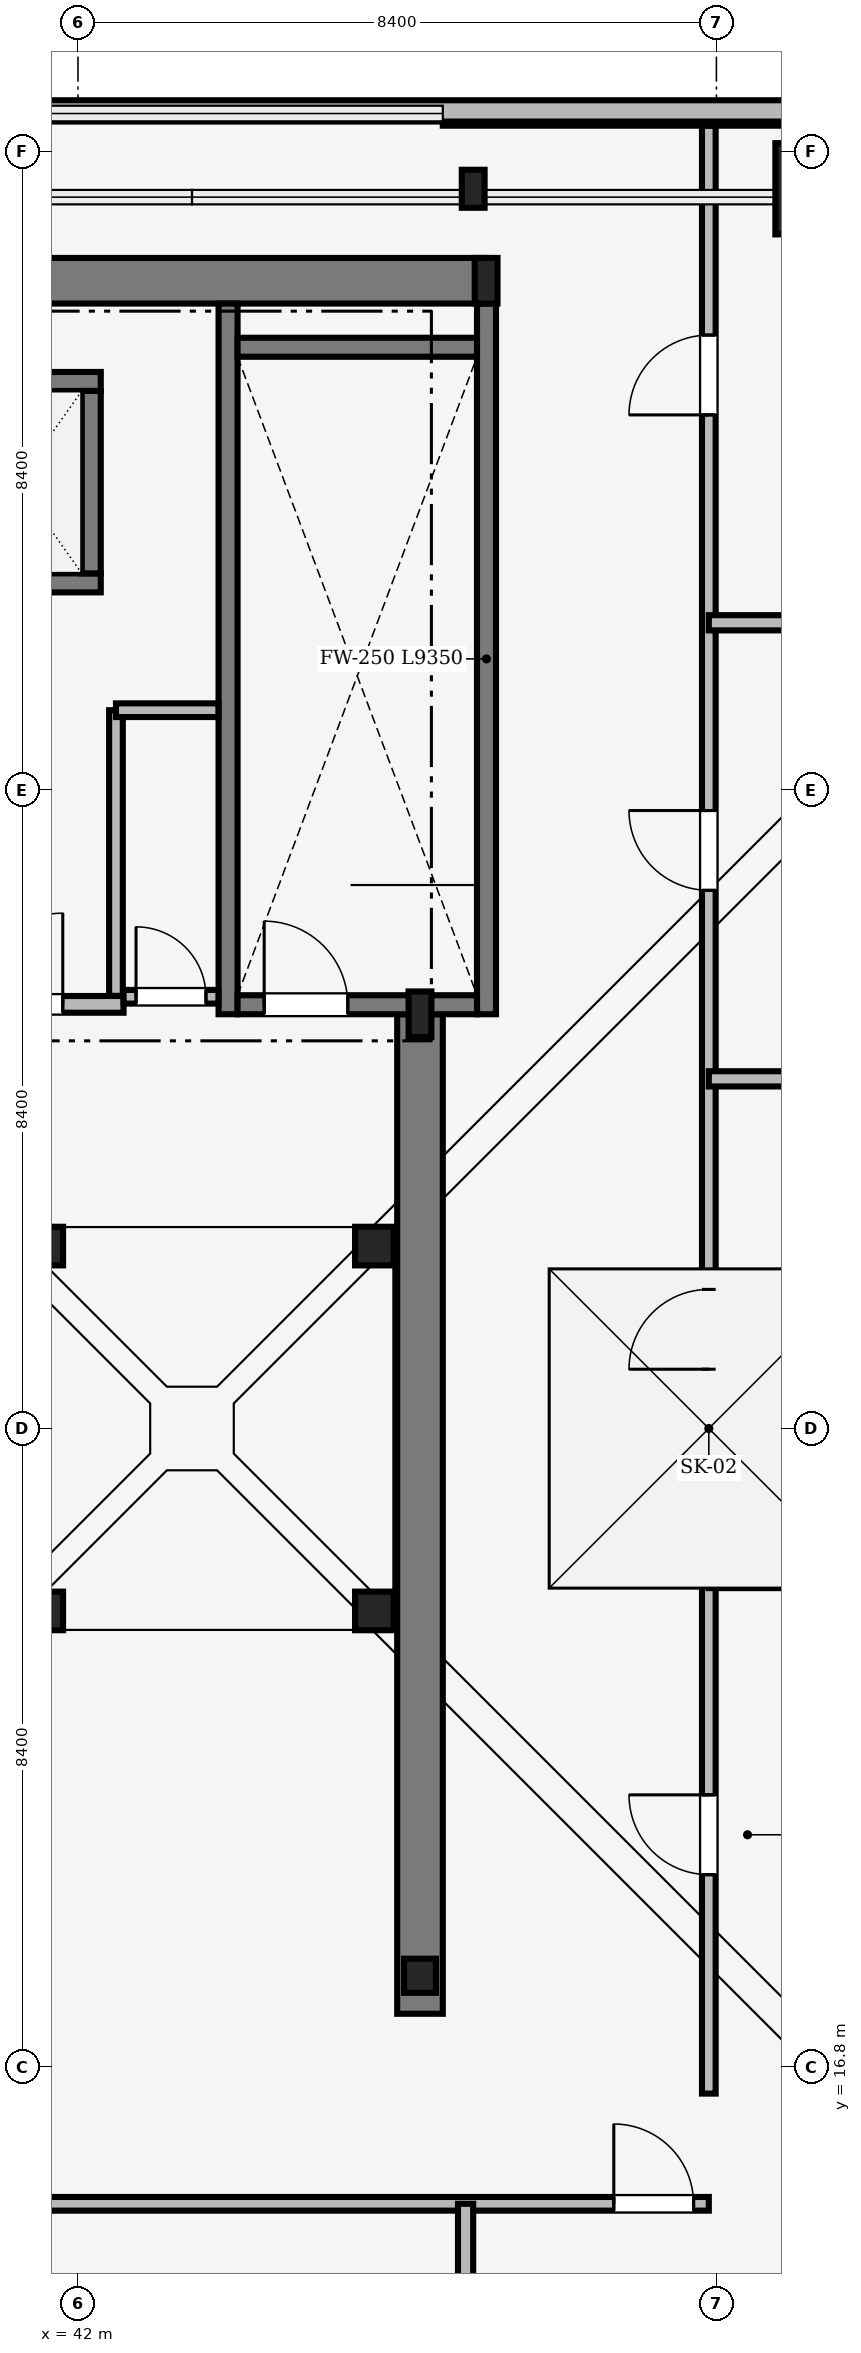
"""IFC4 building model, lengths in metres.
Left out: names, types, materials, properties, quantities, classifications, styles, units other than length and angle.
Written with IfcOpenShell. Run it as: python <this file> out.ifc"""

import sys

from ifc_helpers import new_model, si_unit, direction, frame, frame_2d, origin, origin_2d, place, context, subcontext, project, spatial, rectangle, hollow_circle, i_section, extrude, source, transform, mapped, element, fill, save


model = new_model("IFC4")
c1 = context("Model", 3, precision=1e-05, world=origin(), true_north=direction((0.0, 1.0)))
c2 = subcontext(c1, "Body", "Model", "MODEL_VIEW")
j1 = project(units=[si_unit("LENGTHUNIT", "METRE"), si_unit("PLANEANGLEUNIT", "RADIAN")], contexts=[c1])
p1 = place(None, origin())
s1 = spatial("IfcSite", under=j1, at=p1, CompositionType="ELEMENT")
p2 = place(p1, origin())
s2 = spatial("IfcBuilding", under=s1, at=p2, CompositionType="ELEMENT")
p3 = place(p2, frame((0.0, 0.0, 301.15)))
s3 = spatial("IfcBuildingStorey", under=s2, at=p3, CompositionType="ELEMENT", Elevation=301.15)
m1 = source(origin(), c2, "Body", "SweptSolid", [
    extrude(rectangle(XDim=17.52, YDim=0.6, at=frame_2d((8.76, 0.0))), origin(), (0.0, 0.0, 1.0), 4.7),
])
p4 = place(p3, frame((29.85, 40.3, 0.0), z_axis=(0.0, 0.0, 1.0), x_axis=(1.0, 0.0, 0.0)))
e1 = element("IfcWall", 1, at=p4, inside=s3, PredefinedType="SHEAR", context=c2, shape_type="MappedRepresentation", body=[
    mapped(m1, transform((0.0, 0.0, 0.0), scale=1.0)),
])
m2 = source(origin(), c2, "Body", "SweptSolid", [
    extrude(rectangle(XDim=13.15, YDim=0.6, at=frame_2d((6.575, 0.0))), origin(), (0.0, 0.0, 1.0), 4.7),
])
p5 = place(p3, frame((46.5, 17.5, 0.0), z_axis=(0.0, 0.0, 1.0), x_axis=(0.0, 1.0, 0.0)))
e2 = element("IfcWall", 2, at=p5, inside=s3, PredefinedType="SHEAR", context=c2, shape_type="MappedRepresentation", body=[
    mapped(m2, transform((0.0, 0.0, 0.0), scale=1.0)),
])
m3 = source(origin(), c2, "Body", "SweptSolid", [
    extrude(i_section(OverallWidth=0.3, OverallDepth=0.6, WebThickness=0.015, FlangeThickness=0.03, FilletRadius=0.027, at=origin_2d()), origin(), (0.0, 0.0, 1.0), 4.6),
])
for number, where, z_axis, x_axis in (
    (3, (46.5, 30.65, 0.0), (0.0, 0.0, 1.0), (1.0, 0.0, 0.0)),
    (4, (47.37, 40.3, 0.0), (0.0, 0.0, 1.0), (1.0, 0.0, 0.0)),
):
    element("IfcColumn", number, at=place(p3, frame(where, z_axis=z_axis, x_axis=x_axis)), inside=s3, PredefinedType="COLUMN", context=c2, shape_type="MappedRepresentation", body=[
        mapped(m3, transform((0.0, 0.0, 0.0), scale=1.0)),
    ])
m4 = source(origin(), c2, "Body", "SweptSolid", [
    extrude(rectangle(XDim=1.2, YDim=1.2, at=origin_2d()), origin(), (0.0, 0.0, 1.0), 4.6),
])
p6 = place(p3, frame((51.776, 41.51, 0.0), z_axis=(0.0, 0.0, 1.0), x_axis=(1.0, 0.0, 0.0)))
e5 = element("IfcColumn", 5, at=p6, inside=s3, PredefinedType="COLUMN", context=c2, shape_type="MappedRepresentation", body=[
    mapped(m4, transform((0.0, 0.0, 0.0), scale=1.0)),
])
m5 = source(origin(), c2, "Body", "SweptSolid", [
    extrude(i_section(OverallWidth=0.3, OverallDepth=0.5, WebThickness=0.014, FlangeThickness=0.028, FilletRadius=0.027, at=origin_2d()), origin(), (0.0, 0.0, 1.0), 4.6),
])
p7 = place(p3, frame((47.2, 41.51, 0.0), z_axis=(0.0, 0.0, 1.0), x_axis=(1.0, 0.0, 0.0)))
e6 = element("IfcColumn", 6, at=p7, inside=s3, PredefinedType="COLUMN", context=c2, shape_type="MappedRepresentation", body=[
    mapped(m5, transform((0.0, 0.0, 0.0), scale=1.0)),
])
m6 = source(origin(), c2, "Body", "SweptSolid", [
    extrude(i_section(OverallWidth=0.419, OverallDepth=0.449, WebThickness=0.031, FlangeThickness=0.048, FilletRadius=0.015, at=origin_2d()), origin(), (0.0, 0.0, 1.0), 4.6),
])
p8 = place(p3, frame((46.5, 18.0, 0.0), z_axis=(0.0, 0.0, 1.0), x_axis=(1.0, 0.0, 0.0)))
e7 = element("IfcColumn", 7, at=p8, inside=s3, PredefinedType="COLUMN", context=c2, shape_type="MappedRepresentation", body=[
    mapped(m6, transform((0.0, 0.0, 0.0), scale=1.0)),
])
m7 = source(origin(), c2, "Body", "SweptSolid", [
    extrude(hollow_circle(Radius=0.254, WallThickness=0.025, at=origin_2d()), origin(), (0.0, 0.0, 1.0), 17.12),
])
for number, where, z_axis, x_axis in (
    (8, (41.55, 22.8, 4.6), (0.0, 0.0, 1.0), (1.0, 0.0, 0.0)),
    (9, (45.9, 22.8, 4.6), (0.0, 0.0, 1.0), (1.0, 0.0, 0.0)),
    (10, (45.9, 27.6, 4.6), (0.0, 0.0, 1.0), (1.0, 0.0, 0.0)),
    (11, (41.55, 27.6, 4.6), (0.0, 0.0, 1.0), (1.0, 0.0, 0.0)),
):
    element("IfcColumn", number, at=place(p3, frame(where, z_axis=z_axis, x_axis=x_axis)), inside=s3, PredefinedType="COLUMN", context=c2, shape_type="MappedRepresentation", body=[
        mapped(m7, transform((0.0, 0.0, 0.0), scale=1.0)),
    ])
m8 = source(origin(), c2, "Body", "SweptSolid", [
    extrude(rectangle(XDim=10.493, YDim=0.32, at=frame_2d((5.247, 0.0))), origin(), (0.0, 0.0, 1.0), 4.6),
])
p9 = place(p3, frame((57.293, 42.5, 0.0), z_axis=(0.0, 0.0, 1.0), x_axis=(-1.0, 0.0, 0.0)))
e12 = element("IfcWall", 12, at=p9, inside=s3, PredefinedType="SOLIDWALL", context=c2, shape_type="MappedRepresentation", body=[
    mapped(m8, transform((0.0, 0.0, 0.0), scale=1.0)),
])
m9 = source(origin(), c2, "Body", "SweptSolid", [
    extrude(rectangle(XDim=2.4, YDim=3.2, at=frame_2d((1.2, 1.6))), frame((0.0, 0.17, 0.0), z_axis=(0.0, -1.0, 0.0), x_axis=(1.0, 0.0, 0.0)), (0.0, 0.0, 1.0), 0.34),
])
p10 = place(p9, frame((1.884, 0.0, 0.72)))
e13 = element("IfcOpeningElement", 13, at=p10, cuts=e12, PredefinedType="OPENING", context=c2, shape_type="MappedRepresentation", body=[
    mapped(m9, transform((0.0, 0.0, 0.0), scale=1.0)),
])
m10 = source(origin(), c2, "Body", "SweptSolid", [
    extrude(rectangle(XDim=27.388, YDim=0.28, at=frame_2d((13.694, 0.0))), origin(), (0.0, 0.0, 1.0), 1.15),
])
p11 = place(p3, frame((57.194, 42.534, 5.0), z_axis=(0.0, 0.0, 1.0), x_axis=(-1.0, 0.0, 0.0)))
e14 = element("IfcWall", 14, at=p11, inside=s3, PredefinedType="SOLIDWALL", context=c2, shape_type="MappedRepresentation", body=[
    mapped(m10, transform((0.0, 0.0, 0.0), scale=1.0)),
])
m11 = source(origin(), c2, "Body", "SweptSolid", [
    extrude(rectangle(XDim=9.35, YDim=0.25, at=frame_2d((4.675, 0.0))), origin(), (0.0, 0.0, 1.0), 4.6),
])
for number, where, z_axis, x_axis in (
    (15, (43.975, 30.65, 0.0), (0.0, 0.0, 1.0), (0.0, 1.0, 0.0)),
    (16, (47.375, 30.65, 0.0), (0.0, 0.0, 1.0), (0.0, 1.0, 0.0)),
):
    element("IfcWall", number, at=place(p3, frame(where, z_axis=z_axis, x_axis=x_axis)), inside=s3, PredefinedType="SOLIDWALL", context=c2, shape_type="MappedRepresentation", body=[
        mapped(m11, transform((0.0, 0.0, 0.0), scale=1.0)),
    ])
m12 = source(origin(), c2, "Body", "SweptSolid", [
    extrude(rectangle(XDim=3.15, YDim=0.25, at=frame_2d((1.575, 0.0))), origin(), (0.0, 0.0, 1.0), 4.6),
])
p12 = place(p3, frame((44.1, 39.425, 0.0), z_axis=(0.0, 0.0, 1.0), x_axis=(1.0, 0.0, 0.0)))
e17 = element("IfcWall", 17, at=p12, inside=s3, PredefinedType="SOLIDWALL", context=c2, shape_type="MappedRepresentation", body=[
    mapped(m12, transform((0.0, 0.0, 0.0), scale=1.0)),
])
p13 = place(p3, frame((44.1, 30.775, 0.0), z_axis=(0.0, 0.0, 1.0), x_axis=(1.0, 0.0, 0.0)))
e18 = element("IfcWall", 18, at=p13, inside=s3, PredefinedType="SOLIDWALL", context=c2, shape_type="MappedRepresentation", body=[
    mapped(m12, transform((0.0, 0.0, 0.0), scale=1.0)),
])
m13 = source(origin(), c2, "Body", "SweptSolid", [
    extrude(rectangle(XDim=1.1, YDim=2.2, at=frame_2d((0.55, 1.1))), frame((0.0, 0.135, 0.0), z_axis=(0.0, -1.0, 0.0), x_axis=(1.0, 0.0, 0.0)), (0.0, 0.0, 1.0), 0.27),
])
p14 = place(p13, frame((0.35, 0.0, 0.0)))
e19 = element("IfcOpeningElement", 19, at=p14, cuts=e18, PredefinedType="OPENING", context=c2, shape_type="MappedRepresentation", body=[
    mapped(m13, transform((0.0, 0.0, 0.0), scale=1.0)),
])
m14 = source(origin(), c2, "Body", "SweptSolid", [
    extrude(rectangle(XDim=2.8, YDim=0.22, at=frame_2d((1.4, 0.0))), origin(), (0.0, 0.0, 1.0), 4.6),
])
p15 = place(p3, frame((39.8, 30.78, 0.0), z_axis=(0.0, 0.0, 1.0), x_axis=(1.0, 0.0, 0.0)))
e20 = element("IfcWall", 20, at=p15, inside=s3, PredefinedType="SOLIDWALL", context=c2, shape_type="MappedRepresentation", body=[
    mapped(m14, transform((0.0, 0.0, 0.0), scale=1.0)),
])
m15 = source(origin(), c2, "Body", "SweptSolid", [
    extrude(rectangle(XDim=1.2, YDim=2.2, at=frame_2d((0.6, 1.1))), frame((0.0, 0.12, 0.0), z_axis=(0.0, -1.0, 0.0), x_axis=(1.0, 0.0, 0.0)), (0.0, 0.0, 1.0), 0.24),
])
p16 = place(p15, frame((0.8, 0.0, 0.0)))
e21 = element("IfcOpeningElement", 21, at=p16, cuts=e20, PredefinedType="OPENING", context=c2, shape_type="MappedRepresentation", body=[
    mapped(m15, transform((0.0, 0.0, 0.0), scale=1.0)),
])
m16 = source(origin(), c2, "Body", "SweptSolid", [
    extrude(rectangle(XDim=2.55, YDim=0.25, at=frame_2d((1.275, 0.0))), origin(), (0.0, 0.0, 1.0), 4.6),
])
p17 = place(p3, frame((39.75, 36.325, 0.0), z_axis=(0.0, 0.0, 1.0), x_axis=(1.0, 0.0, 0.0)))
e22 = element("IfcWall", 22, at=p17, inside=s3, PredefinedType="SOLIDWALL", context=c2, shape_type="MappedRepresentation", body=[
    mapped(m16, transform((0.0, 0.0, 0.0), scale=1.0)),
])
m17 = source(origin(), c2, "Body", "SweptSolid", [
    extrude(rectangle(XDim=1.2, YDim=2.25, at=frame_2d((0.6, 1.125))), frame((0.0, 0.135, 0.0), z_axis=(0.0, -1.0, 0.0), x_axis=(1.0, 0.0, 0.0)), (0.0, 0.0, 1.0), 0.27),
])
p18 = place(p17, frame((0.675, 0.0, 0.0)))
e23 = element("IfcOpeningElement", 23, at=p18, cuts=e22, PredefinedType="OPENING", context=c2, shape_type="MappedRepresentation", body=[
    mapped(m17, transform((0.0, 0.0, 0.0), scale=1.0)),
])
p19 = place(p3, frame((39.75, 38.975, 0.0), z_axis=(0.0, 0.0, 1.0), x_axis=(1.0, 0.0, 0.0)))
e24 = element("IfcWall", 24, at=p19, inside=s3, PredefinedType="SOLIDWALL", context=c2, shape_type="MappedRepresentation", body=[
    mapped(m16, transform((0.0, 0.0, 0.0), scale=1.0)),
])
m18 = source(origin(), c2, "Body", "SweptSolid", [
    extrude(rectangle(XDim=2.4, YDim=0.25, at=frame_2d((1.2, 0.0))), origin(), (0.0, 0.0, 1.0), 4.6),
])
p20 = place(p3, frame((42.175, 36.45, 0.0), z_axis=(0.0, 0.0, 1.0), x_axis=(0.0, 1.0, 0.0)))
e25 = element("IfcWall", 25, at=p20, inside=s3, PredefinedType="SOLIDWALL", context=c2, shape_type="MappedRepresentation", body=[
    mapped(m18, transform((0.0, 0.0, 0.0), scale=1.0)),
])
m19 = source(origin(), c2, "Body", "SweptSolid", [
    extrude(rectangle(XDim=25.888, YDim=0.18, at=frame_2d((12.944, 0.0))), origin(), (0.0, 0.0, 1.0), 4.142),
])
p21 = place(p3, frame((50.3, 16.45, 0.0), z_axis=(0.0, 0.0, 1.0), x_axis=(0.0, 1.0, 0.0)))
e26 = element("IfcWall", 26, at=p21, inside=s3, PredefinedType="PARTITIONING", context=c2, shape_type="MappedRepresentation", body=[
    mapped(m19, transform((0.0, 0.0, 0.0), scale=1.0)),
])
m20 = source(origin(), c2, "Body", "SweptSolid", [
    extrude(rectangle(XDim=1.05, YDim=2.2, at=frame_2d((0.525, 1.1))), frame((0.0, 0.1, 0.0), z_axis=(0.0, -1.0, 0.0), x_axis=(1.0, 0.0, 0.0)), (0.0, 0.0, 1.0), 0.2),
])
p22 = place(p21, frame((2.88, 0.0, 0.0)))
e27 = element("IfcOpeningElement", 27, at=p22, cuts=e26, PredefinedType="OPENING", context=c2, shape_type="MappedRepresentation", body=[
    mapped(m20, transform((0.0, 0.0, 0.0), scale=1.0)),
])
p23 = place(p21, frame((9.53, 0.0, 0.0)))
e28 = element("IfcOpeningElement", 28, at=p23, cuts=e26, PredefinedType="OPENING", context=c2, shape_type="MappedRepresentation", body=[
    mapped(m20, transform((0.0, 0.0, 0.0), scale=1.0)),
])
p24 = place(p21, frame((15.83, 0.0, 0.0)))
e29 = element("IfcOpeningElement", 29, at=p24, cuts=e26, PredefinedType="OPENING", context=c2, shape_type="MappedRepresentation", body=[
    mapped(m20, transform((0.0, 0.0, 0.0), scale=1.0)),
])
p25 = place(p21, frame((22.085, 0.0, 0.0)))
e30 = element("IfcOpeningElement", 30, at=p25, cuts=e26, PredefinedType="OPENING", context=c2, shape_type="MappedRepresentation", body=[
    mapped(m20, transform((0.0, 0.0, 0.0), scale=1.0)),
])
m21 = source(origin(), c2, "Body", "SweptSolid", [
    extrude(rectangle(XDim=23.938, YDim=0.18, at=frame_2d((11.969, 0.0))), origin(), (0.0, 0.0, 1.0), 4.142),
])
p26 = place(p3, frame((26.362, 15.0, 0.0), z_axis=(0.0, 0.0, 1.0), x_axis=(1.0, 0.0, 0.0)))
e31 = element("IfcWall", 31, at=p26, inside=s3, PredefinedType="PARTITIONING", context=c2, shape_type="MappedRepresentation", body=[
    mapped(m21, transform((0.0, 0.0, 0.0), scale=1.0)),
])
p27 = place(p26, frame((10.523, 0.0, 0.0)))
e32 = element("IfcOpeningElement", 32, at=p27, cuts=e31, PredefinedType="OPENING", context=c2, shape_type="MappedRepresentation", body=[
    mapped(m20, transform((0.0, 0.0, 0.0), scale=1.0)),
])
p28 = place(p26, frame((22.688, 0.0, 0.0)))
e33 = element("IfcOpeningElement", 33, at=p28, cuts=e31, PredefinedType="OPENING", context=c2, shape_type="MappedRepresentation", body=[
    mapped(m20, transform((0.0, 0.0, 0.0), scale=1.0)),
])
m22 = source(origin(), c2, "Body", "SweptSolid", [
    extrude(rectangle(XDim=1.248, YDim=0.18, at=frame_2d((0.624, 0.0))), origin(), (0.0, 0.0, 1.0), 4.6),
])
p29 = place(p3, frame((42.6, 30.88, 0.0), z_axis=(0.0, 0.0, 1.0), x_axis=(1.0, 0.0, 0.0)))
e34 = element("IfcWall", 34, at=p29, inside=s3, PredefinedType="PARTITIONING", context=c2, shape_type="MappedRepresentation", body=[
    mapped(m22, transform((0.0, 0.0, 0.0), scale=1.0)),
])
m23 = source(origin(), c2, "Body", "SweptSolid", [
    extrude(rectangle(XDim=0.92, YDim=2.1, at=frame_2d((0.46, 1.05))), frame((0.0, 0.1, 0.0), z_axis=(0.0, -1.0, 0.0), x_axis=(1.0, 0.0, 0.0)), (0.0, 0.0, 1.0), 0.2),
])
p30 = place(p29, frame((0.164, 0.0, 0.0)))
e35 = element("IfcOpeningElement", 35, at=p30, cuts=e34, PredefinedType="OPENING", context=c2, shape_type="MappedRepresentation", body=[
    mapped(m23, transform((0.0, 0.0, 0.0), scale=1.0)),
])
m24 = source(origin(), c2, "Body", "SweptSolid", [
    extrude(rectangle(XDim=10.392, YDim=0.2, at=frame_2d((5.196, 0.0))), origin(), (0.0, 0.0, 1.0), 4.142),
])
p31 = place(p3, frame((50.3, 23.2, 0.0), z_axis=(0.0, 0.0, 1.0), x_axis=(1.0, 0.0, 0.0)))
e36 = element("IfcWall", 36, at=p31, inside=s3, PredefinedType="PARTITIONING", context=c2, shape_type="MappedRepresentation", body=[
    mapped(m24, transform((0.0, 0.0, 0.0), scale=1.0)),
])
m25 = source(origin(), c2, "Body", "SweptSolid", [
    extrude(rectangle(XDim=10.338, YDim=0.2, at=frame_2d((5.169, 0.0))), origin(), (0.0, 0.0, 1.0), 4.142),
])
for number, where, z_axis, x_axis in (
    (37, (50.3, 29.8, 0.0), (0.0, 0.0, 1.0), (1.0, 0.0, 0.0)),
    (38, (50.3, 35.8, 0.0), (0.0, 0.0, 1.0), (1.0, 0.0, 0.0)),
):
    element("IfcWall", number, at=place(p3, frame(where, z_axis=z_axis, x_axis=x_axis)), inside=s3, PredefinedType="PARTITIONING", context=c2, shape_type="MappedRepresentation", body=[
        mapped(m25, transform((0.0, 0.0, 0.0), scale=1.0)),
    ])
m26 = source(origin(), c2, "Body", "SweptSolid", [
    extrude(rectangle(XDim=6.938, YDim=0.2, at=frame_2d((3.469, 0.0))), origin(), (0.0, 0.0, 1.0), 4.142),
])
p32 = place(p3, frame((47.1, 8.062, 0.0), z_axis=(0.0, 0.0, 1.0), x_axis=(0.0, 1.0, 0.0)))
e39 = element("IfcWall", 39, at=p32, inside=s3, PredefinedType="PARTITIONING", context=c2, shape_type="MappedRepresentation", body=[
    mapped(m26, transform((0.0, 0.0, 0.0), scale=1.0)),
])
m27 = source(origin(), c2, "Body", "SweptSolid", [
    extrude(rectangle(XDim=3.758, YDim=0.18, at=frame_2d((1.879, 0.0))), origin(), (0.0, 0.0, 1.0), 4.6),
])
p33 = place(p3, frame((42.5, 30.892, 0.0), z_axis=(0.0, 0.0, 1.0), x_axis=(0.0, 1.0, 0.0)))
e40 = element("IfcWall", 40, at=p33, inside=s3, PredefinedType="PARTITIONING", context=c2, shape_type="MappedRepresentation", body=[
    mapped(m27, transform((0.0, 0.0, 0.0), scale=1.0)),
])
m28 = source(origin(), c2, "Body", "SweptSolid", [
    extrude(rectangle(XDim=1.348, YDim=0.18, at=frame_2d((0.674, 0.0))), origin(), (0.0, 0.0, 1.0), 4.6),
])
p34 = place(p3, frame((42.5, 34.65, 0.0), z_axis=(0.0, 0.0, 1.0), x_axis=(1.0, 0.0, 0.0)))
e41 = element("IfcWall", 41, at=p34, inside=s3, PredefinedType="PARTITIONING", context=c2, shape_type="MappedRepresentation", body=[
    mapped(m28, transform((0.0, 0.0, 0.0), scale=1.0)),
])
p35 = place(p3, frame((0.0, 0.0, 4.6)))
p36 = place(p35, frame((50.3, 25.2, 0.35)))
e42 = element("IfcWindow", 42, at=p36, inside=s3, PartitioningType="SINGLE_PANEL", PredefinedType="SKYLIGHT", context=c2, shape_type="SweptSolid", body=[
    extrude(rectangle(XDim=4.2, YDim=4.2, at=origin_2d()), origin(), (0.0, 0.0, 1.0), 0.05),
])
m29 = source(origin(), c2, "Body", "SweptSolid", [
    extrude(rectangle(XDim=1.1, YDim=2.2, at=frame_2d((0.55, 1.1))), frame((0.0, 0.025, 0.0), z_axis=(0.0, -1.0, 0.0), x_axis=(1.0, 0.0, 0.0)), (0.0, 0.0, 1.0), 0.05),
])
p37 = place(p14, origin())
e43 = element("IfcDoor", 43, at=p37, inside=s3, OperationType="SINGLE_SWING_LEFT", PredefinedType="DOOR", context=c2, shape_type="MappedRepresentation", body=[
    mapped(m29, transform((0.0, 0.0, 0.0), scale=1.0)),
])
fill(e19, e43)
m30 = source(origin(), c2, "Body", "SweptSolid", [
    extrude(rectangle(XDim=1.2, YDim=2.2, at=frame_2d((0.6, 1.1))), frame((0.0, 0.025, 0.0), z_axis=(0.0, -1.0, 0.0), x_axis=(1.0, 0.0, 0.0)), (0.0, 0.0, 1.0), 0.05),
])
p38 = place(p16, origin())
e44 = element("IfcDoor", 44, at=p38, inside=s3, OperationType="SINGLE_SWING_RIGHT", PredefinedType="DOOR", context=c2, shape_type="MappedRepresentation", body=[
    mapped(m30, transform((0.0, 0.0, 0.0), scale=1.0)),
])
fill(e21, e44)
m31 = source(origin(), c2, "Body", "SweptSolid", [
    extrude(rectangle(XDim=1.05, YDim=2.2, at=frame_2d((0.525, 1.1))), frame((0.0, 0.025, 0.0), z_axis=(0.0, -1.0, 0.0), x_axis=(1.0, 0.0, 0.0)), (0.0, 0.0, 1.0), 0.05),
])
p39 = place(p22, origin())
e45 = element("IfcDoor", 45, at=p39, inside=s3, OperationType="SINGLE_SWING_RIGHT", PredefinedType="DOOR", context=c2, shape_type="MappedRepresentation", body=[
    mapped(m31, transform((0.0, 0.0, 0.0), scale=1.0)),
])
fill(e27, e45)
p40 = place(p23, origin())
e46 = element("IfcDoor", 46, at=p40, inside=s3, OperationType="SINGLE_SWING_LEFT", PredefinedType="DOOR", context=c2, shape_type="MappedRepresentation", body=[
    mapped(m31, transform((0.0, 0.0, 0.0), scale=1.0)),
])
fill(e28, e46)
p41 = place(p24, origin())
e47 = element("IfcDoor", 47, at=p41, inside=s3, OperationType="SINGLE_SWING_RIGHT", PredefinedType="DOOR", context=c2, shape_type="MappedRepresentation", body=[
    mapped(m31, transform((0.0, 0.0, 0.0), scale=1.0)),
])
fill(e29, e47)
p42 = place(p25, origin())
e48 = element("IfcDoor", 48, at=p42, inside=s3, OperationType="SINGLE_SWING_LEFT", PredefinedType="DOOR", context=c2, shape_type="MappedRepresentation", body=[
    mapped(m31, transform((0.0, 0.0, 0.0), scale=1.0)),
])
fill(e30, e48)
p43 = place(p28, origin())
e49 = element("IfcDoor", 49, at=p43, inside=s3, OperationType="SINGLE_SWING_LEFT", PredefinedType="DOOR", context=c2, shape_type="MappedRepresentation", body=[
    mapped(m31, transform((0.0, 0.0, 0.0), scale=1.0)),
])
fill(e33, e49)
m32 = source(origin(), c2, "Body", "SweptSolid", [
    extrude(rectangle(XDim=0.92, YDim=2.1, at=frame_2d((0.46, 1.05))), frame((0.0, 0.025, 0.0), z_axis=(0.0, -1.0, 0.0), x_axis=(1.0, 0.0, 0.0)), (0.0, 0.0, 1.0), 0.05),
])
p44 = place(p30, origin())
e50 = element("IfcDoor", 50, at=p44, inside=s3, OperationType="SINGLE_SWING_LEFT", PredefinedType="DOOR", context=c2, shape_type="MappedRepresentation", body=[
    mapped(m32, transform((0.0, 0.0, 0.0), scale=1.0)),
])
fill(e35, e50)
save(model, sys.argv[1])
